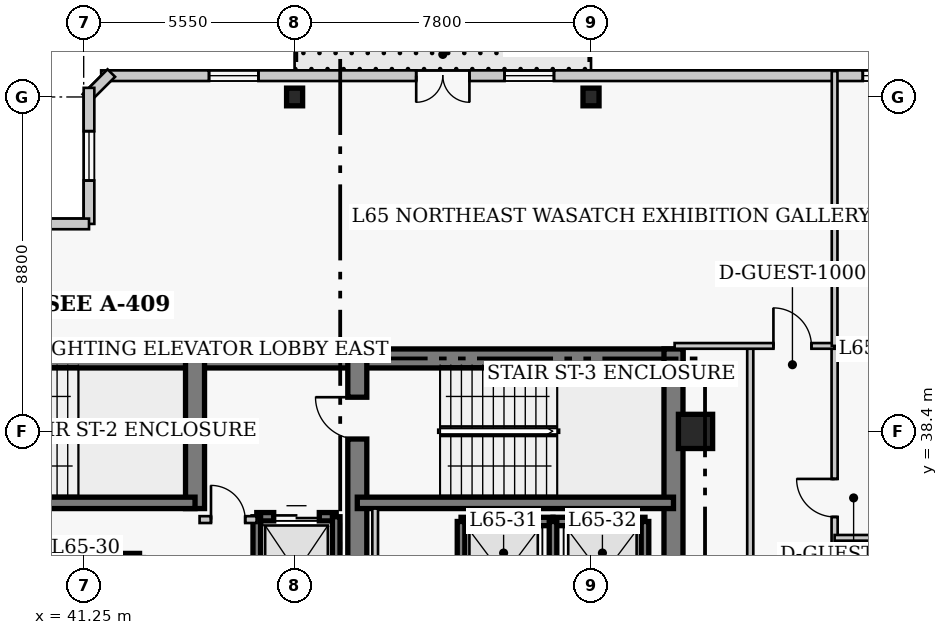
"""IFC4 building model, lengths in metres.
Left out: names, types, materials, properties, quantities, classifications, styles, units other than length and angle.
Written with IfcOpenShell. Run it as: python <this file> out.ifc"""

import sys

from ifc_helpers import new_model, si_unit, direction, frame, frame_2d, origin, origin_2d, place, context, subcontext, project, spatial, rectangle, i_section, extrude, element, fill, save


model = new_model("IFC4")
c1 = context("Model", 3, precision=1e-05, world=origin(), true_north=direction((0.0, 1.0)))
c2 = subcontext(c1, "Body", "Model", "MODEL_VIEW")
j1 = project(units=[si_unit("LENGTHUNIT", "METRE"), si_unit("PLANEANGLEUNIT", "RADIAN")], contexts=[c1])
p1 = place(None, origin())
s1 = spatial("IfcSite", under=j1, at=p1, CompositionType="ELEMENT")
p2 = place(p1, origin())
s2 = spatial("IfcBuilding", under=s1, at=p2, CompositionType="ELEMENT")
p3 = place(p2, frame((0.0, 0.0, 261.4)))
s3 = spatial("IfcBuildingStorey", under=s2, at=p3, CompositionType="ELEMENT", Elevation=261.4)
p4 = place(p3, frame((35.85, 40.32, 0.0), z_axis=(0.0, 0.0, 1.0), x_axis=(1.0, 0.0, 0.0)))
e1 = element("IfcWall", 1, at=p4, inside=s3, PredefinedType="SHEAR", context=c2, shape_type="SweptSolid", body=[
    extrude(rectangle(XDim=12.6, YDim=0.5, at=frame_2d((6.3, 0.0))), origin(), (0.0, 0.0, 1.0), 4.0),
])
p5 = place(p3, frame((48.45, 40.32, 0.0), z_axis=(0.0, 0.0, 1.0), x_axis=(1.0, 0.0, 0.0)))
e2 = element("IfcWall", 2, at=p5, inside=s3, PredefinedType="SHEAR", context=c2, shape_type="SweptSolid", body=[
    extrude(rectangle(XDim=8.57, YDim=0.5, at=frame_2d((4.285, 0.0))), origin(), (0.0, 0.0, 1.0), 4.0),
])
p6 = place(p3, frame((56.77, 27.05, 0.0), z_axis=(0.0, 0.0, 1.0), x_axis=(0.0, 1.0, 0.0)))
e3 = element("IfcWall", 3, at=p6, inside=s3, PredefinedType="SHEAR", context=c2, shape_type="SweptSolid", body=[
    extrude(rectangle(XDim=13.52, YDim=0.5, at=frame_2d((6.76, 0.0))), origin(), (0.0, 0.0, 1.0), 4.0),
])
p7 = place(p3, frame((44.18, 36.37, 0.0), z_axis=(0.0, 0.0, 1.0), x_axis=(0.0, 1.0, 0.0)))
e4 = element("IfcWall", 4, at=p7, inside=s3, PredefinedType="SHEAR", context=c2, shape_type="SweptSolid", body=[
    extrude(rectangle(XDim=3.95, YDim=0.5, at=frame_2d((1.975, 0.0))), origin(), (0.0, 0.0, 1.0), 4.0),
])
p8 = place(p3, frame((48.45, 32.5, 0.0), z_axis=(0.0, 0.0, 1.0), x_axis=(0.0, 1.0, 0.0)))
e5 = element("IfcWall", 5, at=p8, inside=s3, PredefinedType="SHEAR", context=c2, shape_type="SweptSolid", body=[
    extrude(rectangle(XDim=7.82, YDim=0.5, at=frame_2d((3.91, 0.0))), origin(), (0.0, 0.0, 1.0), 4.0),
])
p9 = place(p8, frame((5.7, 0.0, 0.0)))
e6 = element("IfcOpeningElement", 6, at=p9, cuts=e5, PredefinedType="OPENING", context=c2, shape_type="SweptSolid", body=[
    extrude(rectangle(XDim=1.1, YDim=2.15, at=frame_2d((0.55, 1.075))), frame((0.0, 0.26, 0.0), z_axis=(0.0, -1.0, 0.0), x_axis=(1.0, 0.0, 0.0)), (0.0, 0.0, 1.0), 0.52),
])
p10 = place(p3, frame((35.85, 36.52, 0.0), z_axis=(0.0, 0.0, 1.0), x_axis=(1.0, 0.0, 0.0)))
e7 = element("IfcWall", 7, at=p10, inside=s3, PredefinedType="SHEAR", context=c2, shape_type="SweptSolid", body=[
    extrude(rectangle(XDim=8.33, YDim=0.3, at=frame_2d((4.165, 0.0))), origin(), (0.0, 0.0, 1.0), 4.0),
])
p11 = place(p3, frame((48.45, 36.52, 0.0), z_axis=(0.0, 0.0, 1.0), x_axis=(1.0, 0.0, 0.0)))
e8 = element("IfcWall", 8, at=p11, inside=s3, PredefinedType="SHEAR", context=c2, shape_type="SweptSolid", body=[
    extrude(rectangle(XDim=8.32, YDim=0.3, at=frame_2d((4.16, 0.0))), origin(), (0.0, 0.0, 1.0), 4.0),
])
for number, where, z_axis, x_axis in (
    (9, (46.8, 47.2, 0.0), (0.0, 0.0, 1.0), (1.0, 0.0, 0.0)),
    (10, (54.6, 47.2, 0.0), (0.0, 0.0, 1.0), (1.0, 0.0, 0.0)),
):
    element("IfcColumn", number, at=place(p3, frame(where, z_axis=z_axis, x_axis=x_axis)), inside=s3, PredefinedType="COLUMN", context=c2, shape_type="SweptSolid", body=[
        extrude(i_section(OverallWidth=0.422, OverallDepth=0.465, WebThickness=0.045, FlangeThickness=0.073, FilletRadius=0.017, at=origin_2d()), origin(), (0.0, 0.0, 1.0), 4.0),
    ])
p12 = place(p3, frame((57.35, 38.4, 0.0), z_axis=(0.0, 0.0, 1.0), x_axis=(1.0, 0.0, 0.0)))
e11 = element("IfcColumn", 11, at=p12, inside=s3, PredefinedType="COLUMN", context=c2, shape_type="SweptSolid", body=[
    extrude(rectangle(XDim=0.9, YDim=0.9, at=origin_2d()), origin(), (0.0, 0.0, 1.0), 4.0),
])
p13 = place(p3, frame((66.54, 47.76, 0.0), z_axis=(0.0, 0.0, 1.0), x_axis=(-1.0, 0.0, 0.0)))
e12 = element("IfcWall", 12, at=p13, inside=s3, PredefinedType="SOLIDWALL", context=c2, shape_type="SweptSolid", body=[
    extrude(rectangle(XDim=24.83, YDim=0.28, at=frame_2d((12.415, 0.0))), origin(), (0.0, 0.0, 1.0), 3.76),
])
p14 = place(p13, frame((15.14, 0.0, 0.0)))
e13 = element("IfcOpeningElement", 13, at=p14, cuts=e12, PredefinedType="OPENING", context=c2, shape_type="SweptSolid", body=[
    extrude(rectangle(XDim=1.4, YDim=2.15, at=frame_2d((0.7, 1.075))), frame((0.0, 0.15, 0.0), z_axis=(0.0, -1.0, 0.0), x_axis=(1.0, 0.0, 0.0)), (0.0, 0.0, 1.0), 0.3),
])
p15 = place(p13, frame((3.488, 0.0, 0.85)))
e14 = element("IfcOpeningElement", 14, at=p15, cuts=e12, PredefinedType="OPENING", context=c2, shape_type="SweptSolid", body=[
    extrude(rectangle(XDim=1.3, YDim=1.7, at=frame_2d((0.65, 0.85))), frame((0.0, 0.15, 0.0), z_axis=(0.0, -1.0, 0.0), x_axis=(1.0, 0.0, 0.0)), (0.0, 0.0, 1.0), 0.3),
])
p16 = place(p13, frame((12.915, 0.0, 0.85)))
e15 = element("IfcOpeningElement", 15, at=p16, cuts=e12, PredefinedType="OPENING", context=c2, shape_type="SweptSolid", body=[
    extrude(rectangle(XDim=1.3, YDim=1.7, at=frame_2d((0.65, 0.85))), frame((0.0, 0.15, 0.0), z_axis=(0.0, -1.0, 0.0), x_axis=(1.0, 0.0, 0.0)), (0.0, 0.0, 1.0), 0.3),
])
p17 = place(p13, frame((20.692, 0.0, 0.85)))
e16 = element("IfcOpeningElement", 16, at=p17, cuts=e12, PredefinedType="OPENING", context=c2, shape_type="SweptSolid", body=[
    extrude(rectangle(XDim=1.3, YDim=1.7, at=frame_2d((0.65, 0.85))), frame((0.0, 0.15, 0.0), z_axis=(0.0, -1.0, 0.0), x_axis=(1.0, 0.0, 0.0)), (0.0, 0.0, 1.0), 0.3),
])
p18 = place(p3, frame((41.977, 47.829, 0.0), z_axis=(0.0, 0.0, 1.0), x_axis=(-0.706975312048, -0.707238225886, 0.0)))
e17 = element("IfcWall", 17, at=p18, inside=s3, PredefinedType="SOLIDWALL", context=c2, shape_type="SweptSolid", body=[
    extrude(rectangle(XDim=0.929, YDim=0.28, at=frame_2d((0.464, 0.0))), origin(), (0.0, 0.0, 1.0), 3.76),
])
p19 = place(p3, frame((41.39, 47.44, 0.0), z_axis=(0.0, 0.0, 1.0), x_axis=(0.0, -1.0, 0.0)))
e18 = element("IfcWall", 18, at=p19, inside=s3, PredefinedType="SOLIDWALL", context=c2, shape_type="SweptSolid", body=[
    extrude(rectangle(XDim=3.58, YDim=0.28, at=frame_2d((1.79, 0.0))), origin(), (0.0, 0.0, 1.0), 3.76),
])
p20 = place(p19, frame((1.14, 0.0, 0.85)))
e19 = element("IfcOpeningElement", 19, at=p20, cuts=e18, PredefinedType="OPENING", context=c2, shape_type="SweptSolid", body=[
    extrude(rectangle(XDim=1.3, YDim=1.7, at=frame_2d((0.65, 0.85))), frame((0.0, 0.15, 0.0), z_axis=(0.0, -1.0, 0.0), x_axis=(1.0, 0.0, 0.0)), (0.0, 0.0, 1.0), 0.3),
])
p21 = place(p3, frame((41.39, 43.86, 0.0), z_axis=(0.0, 0.0, 1.0), x_axis=(-1.0, 0.0, 0.0)))
e20 = element("IfcWall", 20, at=p21, inside=s3, PredefinedType="SOLIDWALL", context=c2, shape_type="SweptSolid", body=[
    extrude(rectangle(XDim=4.78, YDim=0.28, at=frame_2d((2.39, 0.0))), origin(), (0.0, 0.0, 1.0), 3.76),
])
p22 = place(p21, frame((1.74, 0.0, 0.85)))
e21 = element("IfcOpeningElement", 21, at=p22, cuts=e20, PredefinedType="OPENING", context=c2, shape_type="SweptSolid", body=[
    extrude(rectangle(XDim=1.3, YDim=1.7, at=frame_2d((0.65, 0.85))), frame((0.0, 0.15, 0.0), z_axis=(0.0, -1.0, 0.0), x_axis=(1.0, 0.0, 0.0)), (0.0, 0.0, 1.0), 0.3),
])
p23 = place(p3, frame((40.4, 35.08, 0.0), z_axis=(0.0, 0.0, 1.0), x_axis=(1.0, 0.0, 0.0)))
e22 = element("IfcWall", 22, at=p23, inside=s3, PredefinedType="SHEAR", context=c2, shape_type="SweptSolid", body=[
    extrude(rectangle(XDim=2.32, YDim=0.22, at=frame_2d((1.16, 0.0))), origin(), (0.0, 0.0, 1.0), 4.0),
])
p24 = place(p3, frame((51.18, 36.03, 0.0), z_axis=(0.0, 0.0, 1.0), x_axis=(1.0, 0.0, 0.0)))
e23 = element("IfcWall", 23, at=p24, inside=s3, PredefinedType="SHEAR", context=c2, shape_type="SweptSolid", body=[
    extrude(rectangle(XDim=2.42, YDim=0.22, at=frame_2d((1.21, 0.0))), origin(), (0.0, 0.0, 1.0), 4.0),
])
p25 = place(p3, frame((51.18, 33.17, 0.0), z_axis=(0.0, 0.0, 1.0), x_axis=(0.0, 1.0, 0.0)))
e24 = element("IfcWall", 24, at=p25, inside=s3, PredefinedType="SHEAR", context=c2, shape_type="SweptSolid", body=[
    extrude(rectangle(XDim=2.86, YDim=0.2, at=frame_2d((1.43, 0.0))), origin(), (0.0, 0.0, 1.0), 4.0),
])
p26 = place(p3, frame((53.6, 36.03, 0.0), z_axis=(0.0, 0.0, 1.0), x_axis=(1.0, 0.0, 0.0)))
e25 = element("IfcWall", 25, at=p26, inside=s3, PredefinedType="SHEAR", context=c2, shape_type="SweptSolid", body=[
    extrude(rectangle(XDim=2.42, YDim=0.22, at=frame_2d((1.21, 0.0))), origin(), (0.0, 0.0, 1.0), 4.0),
])
for number, where, z_axis, x_axis in (
    (26, (53.6, 33.17, 0.0), (0.0, 0.0, 1.0), (0.0, 1.0, 0.0)),
    (27, (56.02, 33.17, 0.0), (0.0, 0.0, 1.0), (0.0, 1.0, 0.0)),
):
    element("IfcWall", number, at=place(p3, frame(where, z_axis=z_axis, x_axis=x_axis)), inside=s3, PredefinedType="SHEAR", context=c2, shape_type="SweptSolid", body=[
        extrude(rectangle(XDim=2.86, YDim=0.2, at=frame_2d((1.43, 0.0))), origin(), (0.0, 0.0, 1.0), 4.0),
    ])
p27 = place(p3, frame((45.805, 36.155, 0.0), z_axis=(0.0, 0.0, 1.0), x_axis=(1.0, 0.0, 0.0)))
e28 = element("IfcWall", 28, at=p27, inside=s3, PredefinedType="SHEAR", context=c2, shape_type="SweptSolid", body=[
    extrude(rectangle(XDim=2.09, YDim=0.22, at=frame_2d((1.045, 0.0))), origin(), (0.0, 0.0, 1.0), 4.0),
])
p28 = place(p27, frame((0.445, 0.0, 0.0)))
e29 = element("IfcOpeningElement", 29, at=p28, cuts=e28, PredefinedType="OPENING", context=c2, shape_type="SweptSolid", body=[
    extrude(rectangle(XDim=1.2, YDim=2.15, at=frame_2d((0.6, 1.075))), frame((0.0, 0.12, 0.0), z_axis=(0.0, -1.0, 0.0), x_axis=(1.0, 0.0, 0.0)), (0.0, 0.0, 1.0), 0.24),
])
p29 = place(p3, frame((45.805, 32.65, 0.0), z_axis=(0.0, 0.0, 1.0), x_axis=(0.0, 1.0, 0.0)))
e30 = element("IfcWall", 30, at=p29, inside=s3, PredefinedType="SHEAR", context=c2, shape_type="SweptSolid", body=[
    extrude(rectangle(XDim=3.505, YDim=0.2, at=frame_2d((1.752, 0.0))), origin(), (0.0, 0.0, 1.0), 4.0),
])
p30 = place(p3, frame((47.895, 33.245, 0.0), z_axis=(0.0, 0.0, 1.0), x_axis=(0.0, 1.0, 0.0)))
e31 = element("IfcWall", 31, at=p30, inside=s3, PredefinedType="SHEAR", context=c2, shape_type="SweptSolid", body=[
    extrude(rectangle(XDim=2.91, YDim=0.2, at=frame_2d((1.455, 0.0))), origin(), (0.0, 0.0, 1.0), 4.0),
])
p31 = place(p3, frame((44.3, 36.08, 0.0), z_axis=(0.0, 0.0, 1.0), x_axis=(1.0, 0.0, 0.0)))
e32 = element("IfcWall", 32, at=p31, inside=s3, PredefinedType="PARTITIONING", context=c2, shape_type="SweptSolid", body=[
    extrude(rectangle(XDim=1.5, YDim=0.18, at=frame_2d((0.75, 0.0))), origin(), (0.0, 0.0, 1.0), 3.76),
])
p32 = place(p31, frame((0.3, 0.0, 0.0)))
e33 = element("IfcOpeningElement", 33, at=p32, cuts=e32, PredefinedType="OPENING", context=c2, shape_type="SweptSolid", body=[
    extrude(rectangle(XDim=0.9, YDim=2.15, at=frame_2d((0.45, 1.075))), frame((0.0, 0.1, 0.0), z_axis=(0.0, -1.0, 0.0), x_axis=(1.0, 0.0, 0.0)), (0.0, 0.0, 1.0), 0.2),
])
p33 = place(p3, frame((48.92, 32.75, 0.0), z_axis=(0.0, 0.0, 1.0), x_axis=(0.0, 1.0, 0.0)))
e34 = element("IfcWall", 34, at=p33, inside=s3, PredefinedType="PARTITIONING", context=c2, shape_type="SweptSolid", body=[
    extrude(rectangle(XDim=3.62, YDim=0.15, at=frame_2d((1.81, 0.0))), origin(), (0.0, 0.0, 1.0), 3.76),
])
p34 = place(p3, frame((61.01, 22.55, 0.0), z_axis=(0.0, 0.0, 1.0), x_axis=(0.0, 1.0, 0.0)))
e35 = element("IfcWall", 35, at=p34, inside=s3, PredefinedType="PARTITIONING", context=c2, shape_type="SweptSolid", body=[
    extrude(rectangle(XDim=18.1, YDim=0.16, at=frame_2d((9.05, 0.0))), origin(), (0.0, 0.0, 1.0), 3.76),
])
p35 = place(p34, frame((2.65, 0.0, 0.0)))
e36 = element("IfcOpeningElement", 36, at=p35, cuts=e35, PredefinedType="OPENING", context=c2, shape_type="SweptSolid", body=[
    extrude(rectangle(XDim=0.95, YDim=2.1, at=frame_2d((0.475, 1.05))), frame((0.0, 0.09, 0.0), z_axis=(0.0, -1.0, 0.0), x_axis=(1.0, 0.0, 0.0)), (0.0, 0.0, 1.0), 0.18),
])
p36 = place(p34, frame((9.175, 0.0, 0.0)))
e37 = element("IfcOpeningElement", 37, at=p36, cuts=e35, PredefinedType="OPENING", context=c2, shape_type="SweptSolid", body=[
    extrude(rectangle(XDim=0.95, YDim=2.1, at=frame_2d((0.475, 1.05))), frame((0.0, 0.09, 0.0), z_axis=(0.0, -1.0, 0.0), x_axis=(1.0, 0.0, 0.0)), (0.0, 0.0, 1.0), 0.18),
])
p37 = place(p34, frame((13.6, 0.0, 0.0)))
e38 = element("IfcOpeningElement", 38, at=p37, cuts=e35, PredefinedType="OPENING", context=c2, shape_type="SweptSolid", body=[
    extrude(rectangle(XDim=1.0, YDim=2.15, at=frame_2d((0.5, 1.075))), frame((0.0, 0.09, 0.0), z_axis=(0.0, -1.0, 0.0), x_axis=(1.0, 0.0, 0.0)), (0.0, 0.0, 1.0), 0.18),
])
p38 = place(p3, frame((58.79, 24.71, 0.0), z_axis=(0.0, 0.0, 1.0), x_axis=(0.0, 1.0, 0.0)))
e39 = element("IfcWall", 39, at=p38, inside=s3, PredefinedType="PARTITIONING", context=c2, shape_type="SweptSolid", body=[
    extrude(rectangle(XDim=15.94, YDim=0.16, at=frame_2d((7.97, 0.0))), origin(), (0.0, 0.0, 1.0), 3.76),
])
p39 = place(p3, frame((56.8, 40.65, 0.0), z_axis=(0.0, 0.0, 1.0), x_axis=(1.0, 0.0, 0.0)))
e40 = element("IfcWall", 40, at=p39, inside=s3, PredefinedType="PARTITIONING", context=c2, shape_type="SweptSolid", body=[
    extrude(rectangle(XDim=4.21, YDim=0.15, at=frame_2d((2.105, 0.0))), origin(), (0.0, 0.0, 1.0), 3.76),
])
p40 = place(p39, frame((2.6, 0.0, 0.0)))
e41 = element("IfcOpeningElement", 41, at=p40, cuts=e40, PredefinedType="OPENING", context=c2, shape_type="SweptSolid", body=[
    extrude(rectangle(XDim=1.0, YDim=2.15, at=frame_2d((0.5, 1.075))), frame((0.0, 0.085, 0.0), z_axis=(0.0, -1.0, 0.0), x_axis=(1.0, 0.0, 0.0)), (0.0, 0.0, 1.0), 0.17),
])
p41 = place(p3, frame((61.01, 40.65, 0.0), z_axis=(0.0, 0.0, 1.0), x_axis=(0.0, 1.0, 0.0)))
e42 = element("IfcWall", 42, at=p41, inside=s3, PredefinedType="PARTITIONING", context=c2, shape_type="SweptSolid", body=[
    extrude(rectangle(XDim=7.23, YDim=0.15, at=frame_2d((3.615, 0.0))), origin(), (0.0, 0.0, 1.0), 3.76),
])
p42 = place(p3, frame((61.01, 35.6, 0.0), z_axis=(0.0, 0.0, 1.0), x_axis=(1.0, 0.0, 0.0)))
e43 = element("IfcWall", 43, at=p42, inside=s3, PredefinedType="PARTITIONING", context=c2, shape_type="SweptSolid", body=[
    extrude(rectangle(XDim=4.09, YDim=0.15, at=frame_2d((2.045, 0.0))), origin(), (0.0, 0.0, 1.0), 3.76),
])
p43 = place(p14, origin())
e44 = element("IfcDoor", 44, at=p43, inside=s3, OperationType="DOUBLE_DOOR_SINGLE_SWING", PredefinedType="DOOR", context=c2, shape_type="SweptSolid", body=[
    extrude(rectangle(XDim=1.4, YDim=2.15, at=frame_2d((0.7, 1.075))), frame((0.0, 0.025, 0.0), z_axis=(0.0, -1.0, 0.0), x_axis=(1.0, 0.0, 0.0)), (0.0, 0.0, 1.0), 0.05),
])
fill(e13, e44)
p44 = place(p15, origin())
e45 = element("IfcWindow", 45, at=p44, inside=s3, PartitioningType="SINGLE_PANEL", PredefinedType="WINDOW", context=c2, shape_type="SweptSolid", body=[
    extrude(rectangle(XDim=1.3, YDim=1.7, at=frame_2d((0.65, 0.85))), frame((0.0, 0.03, 0.0), z_axis=(0.0, -1.0, 0.0), x_axis=(1.0, 0.0, 0.0)), (0.0, 0.0, 1.0), 0.06),
])
fill(e14, e45)
p45 = place(p16, origin())
e46 = element("IfcWindow", 46, at=p45, inside=s3, PartitioningType="SINGLE_PANEL", PredefinedType="WINDOW", context=c2, shape_type="SweptSolid", body=[
    extrude(rectangle(XDim=1.3, YDim=1.7, at=frame_2d((0.65, 0.85))), frame((0.0, 0.03, 0.0), z_axis=(0.0, -1.0, 0.0), x_axis=(1.0, 0.0, 0.0)), (0.0, 0.0, 1.0), 0.06),
])
fill(e15, e46)
p46 = place(p17, origin())
e47 = element("IfcWindow", 47, at=p46, inside=s3, PartitioningType="SINGLE_PANEL", PredefinedType="WINDOW", context=c2, shape_type="SweptSolid", body=[
    extrude(rectangle(XDim=1.3, YDim=1.7, at=frame_2d((0.65, 0.85))), frame((0.0, 0.03, 0.0), z_axis=(0.0, -1.0, 0.0), x_axis=(1.0, 0.0, 0.0)), (0.0, 0.0, 1.0), 0.06),
])
fill(e16, e47)
p47 = place(p20, origin())
e48 = element("IfcWindow", 48, at=p47, inside=s3, PartitioningType="SINGLE_PANEL", PredefinedType="WINDOW", context=c2, shape_type="SweptSolid", body=[
    extrude(rectangle(XDim=1.3, YDim=1.7, at=frame_2d((0.65, 0.85))), frame((0.0, 0.03, 0.0), z_axis=(0.0, -1.0, 0.0), x_axis=(1.0, 0.0, 0.0)), (0.0, 0.0, 1.0), 0.06),
])
fill(e19, e48)
p48 = place(p28, origin())
e49 = element("IfcDoor", 49, at=p48, inside=s3, OperationType="DOUBLE_DOOR_SLIDING", PredefinedType="DOOR", context=c2, shape_type="SweptSolid", body=[
    extrude(rectangle(XDim=1.2, YDim=2.15, at=frame_2d((0.6, 1.075))), frame((0.0, 0.025, 0.0), z_axis=(0.0, -1.0, 0.0), x_axis=(1.0, 0.0, 0.0)), (0.0, 0.0, 1.0), 0.05),
])
fill(e29, e49)
p49 = place(p32, origin())
e50 = element("IfcDoor", 50, at=p49, inside=s3, OperationType="SINGLE_SWING_LEFT", PredefinedType="DOOR", context=c2, shape_type="SweptSolid", body=[
    extrude(rectangle(XDim=0.9, YDim=2.15, at=frame_2d((0.45, 1.075))), frame((0.0, 0.025, 0.0), z_axis=(0.0, -1.0, 0.0), x_axis=(1.0, 0.0, 0.0)), (0.0, 0.0, 1.0), 0.05),
])
fill(e33, e50)
p50 = place(p40, origin())
e51 = element("IfcDoor", 51, at=p50, inside=s3, OperationType="SINGLE_SWING_LEFT", PredefinedType="DOOR", context=c2, shape_type="SweptSolid", body=[
    extrude(rectangle(XDim=1.0, YDim=2.15, at=frame_2d((0.5, 1.075))), frame((0.0, 0.025, 0.0), z_axis=(0.0, -1.0, 0.0), x_axis=(1.0, 0.0, 0.0)), (0.0, 0.0, 1.0), 0.05),
])
fill(e41, e51)
p51 = place(p37, origin())
e52 = element("IfcDoor", 52, at=p51, inside=s3, OperationType="SINGLE_SWING_RIGHT", PredefinedType="DOOR", context=c2, shape_type="SweptSolid", body=[
    extrude(rectangle(XDim=1.0, YDim=2.15, at=frame_2d((0.5, 1.075))), frame((0.0, 0.025, 0.0), z_axis=(0.0, -1.0, 0.0), x_axis=(1.0, 0.0, 0.0)), (0.0, 0.0, 1.0), 0.05),
])
fill(e38, e52)
p52 = place(p9, origin())
e53 = element("IfcDoor", 53, at=p52, inside=s3, OperationType="SINGLE_SWING_RIGHT", PredefinedType="DOOR", context=c2, shape_type="SweptSolid", body=[
    extrude(rectangle(XDim=1.1, YDim=2.15, at=frame_2d((0.55, 1.075))), frame((0.0, 0.025, 0.0), z_axis=(0.0, -1.0, 0.0), x_axis=(1.0, 0.0, 0.0)), (0.0, 0.0, 1.0), 0.05),
])
fill(e6, e53)
save(model, sys.argv[1])
